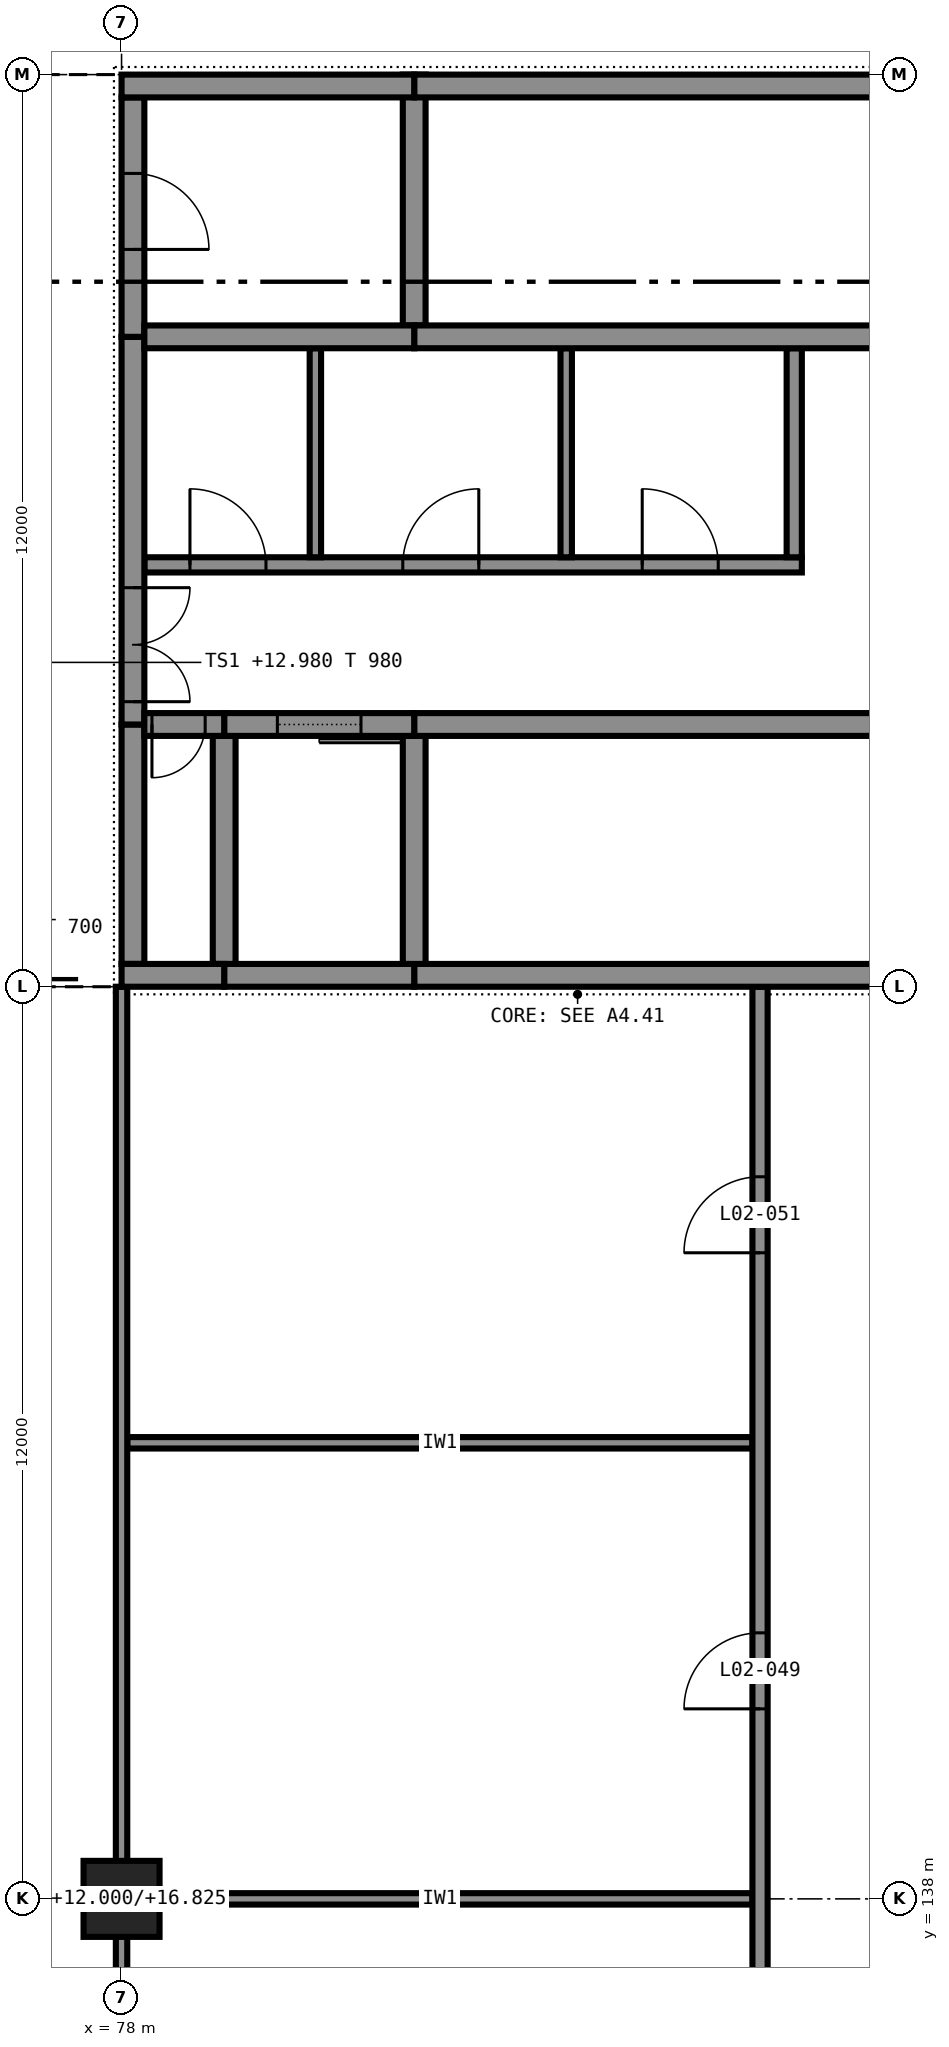
"""IFC4 building model, lengths in metres.
Left out: names, types, materials, properties, quantities, classifications, styles, units other than length and angle.
Written with IfcOpenShell. Run it as: python <this file> out.ifc"""

import sys

from ifc_helpers import new_model, si_unit, direction, frame, frame_2d, origin, origin_2d, place, context, subcontext, project, spatial, rectangle, extrude, element, fill, save


model = new_model("IFC4")
c1 = context("Model", 3, precision=1e-05, world=origin(), true_north=direction((0.0, 1.0)))
c2 = subcontext(c1, "Body", "Model", "MODEL_VIEW")
j1 = project(units=[si_unit("LENGTHUNIT", "METRE"), si_unit("PLANEANGLEUNIT", "RADIAN")], contexts=[c1])
p1 = place(None, origin())
s1 = spatial("IfcSite", under=j1, at=p1, CompositionType="ELEMENT")
p2 = place(p1, origin())
s2 = spatial("IfcBuilding", under=s1, at=p2, CompositionType="ELEMENT")
p3 = place(p2, frame((0.0, 0.0, 12.0)))
s3 = spatial("IfcBuildingStorey", under=s2, at=p3, CompositionType="ELEMENT", Elevation=12.0)
p4 = place(p3, frame((78.0, 138.0, 0.0), z_axis=(0.0, 0.0, 1.0), x_axis=(1.0, 0.0, 0.0)))
e1 = element("IfcColumn", 1, at=p4, inside=s3, PredefinedType="COLUMN", context=c2, shape_type="SweptSolid", body=[
    extrude(rectangle(XDim=1.0, YDim=1.0, at=origin_2d()), origin(), (0.0, 0.0, 1.0), 4.825),
])
p5 = place(p3, frame((90.0, 150.15, 0.0), z_axis=(0.0, 0.0, 1.0), x_axis=(-1.0, 0.0, 0.0)))
e2 = element("IfcWall", 2, at=p5, inside=s3, PredefinedType="SHEAR", context=c2, shape_type="SweptSolid", body=[
    extrude(rectangle(XDim=8.15, YDim=0.3, at=frame_2d((4.075, 0.0))), origin(), (0.0, 0.0, 1.0), 5.0),
])
p6 = place(p5, frame((0.65, 0.0, 0.0)))
e3 = element("IfcOpeningElement", 3, at=p6, cuts=e2, PredefinedType="OPENING", context=c2, shape_type="SweptSolid", body=[
    extrude(rectangle(XDim=0.9, YDim=2.1, at=frame_2d((0.45, 1.05))), frame((0.0, 0.16, 0.0), z_axis=(0.0, -1.0, 0.0), x_axis=(1.0, 0.0, 0.0)), (0.0, 0.0, 1.0), 0.32),
])
p7 = place(p3, frame((81.85, 150.15, 0.0), z_axis=(0.0, 0.0, 1.0), x_axis=(-1.0, 0.0, 0.0)))
e4 = element("IfcWall", 4, at=p7, inside=s3, PredefinedType="SHEAR", context=c2, shape_type="SweptSolid", body=[
    extrude(rectangle(XDim=2.5, YDim=0.3, at=frame_2d((1.25, 0.0))), origin(), (0.0, 0.0, 1.0), 5.0),
])
p8 = place(p3, frame((79.35, 150.15, 0.0), z_axis=(0.0, 0.0, 1.0), x_axis=(-1.0, 0.0, 0.0)))
e5 = element("IfcWall", 5, at=p8, inside=s3, PredefinedType="SHEAR", context=c2, shape_type="SweptSolid", body=[
    extrude(rectangle(XDim=1.35, YDim=0.3, at=frame_2d((0.675, 0.0))), origin(), (0.0, 0.0, 1.0), 5.0),
])
p9 = place(p3, frame((90.0, 161.85, 0.0), z_axis=(0.0, 0.0, 1.0), x_axis=(-1.0, 0.0, 0.0)))
e6 = element("IfcWall", 6, at=p9, inside=s3, PredefinedType="SHEAR", context=c2, shape_type="SweptSolid", body=[
    extrude(rectangle(XDim=8.15, YDim=0.3, at=frame_2d((4.075, 0.0))), origin(), (0.0, 0.0, 1.0), 5.0),
])
p10 = place(p3, frame((81.85, 161.85, 0.0), z_axis=(0.0, 0.0, 1.0), x_axis=(-1.0, 0.0, 0.0)))
e7 = element("IfcWall", 7, at=p10, inside=s3, PredefinedType="SHEAR", context=c2, shape_type="SweptSolid", body=[
    extrude(rectangle(XDim=3.85, YDim=0.3, at=frame_2d((1.925, 0.0))), origin(), (0.0, 0.0, 1.0), 5.0),
])
p11 = place(p3, frame((89.7, 153.45, 0.0), z_axis=(0.0, 0.0, 1.0), x_axis=(-1.0, 0.0, 0.0)))
e8 = element("IfcWall", 8, at=p11, inside=s3, PredefinedType="SHEAR", context=c2, shape_type="SweptSolid", body=[
    extrude(rectangle(XDim=7.85, YDim=0.3, at=frame_2d((3.925, 0.0))), origin(), (0.0, 0.0, 1.0), 5.0),
])
p12 = place(p11, frame((0.5, 0.0, 0.0)))
e9 = element("IfcOpeningElement", 9, at=p12, cuts=e8, PredefinedType="OPENING", context=c2, shape_type="SweptSolid", body=[
    extrude(rectangle(XDim=1.0, YDim=2.1, at=frame_2d((0.5, 1.05))), frame((0.0, 0.16, 0.0), z_axis=(0.0, -1.0, 0.0), x_axis=(1.0, 0.0, 0.0)), (0.0, 0.0, 1.0), 0.32),
])
p13 = place(p3, frame((81.85, 153.45, 0.0), z_axis=(0.0, 0.0, 1.0), x_axis=(-1.0, 0.0, 0.0)))
e10 = element("IfcWall", 10, at=p13, inside=s3, PredefinedType="SHEAR", context=c2, shape_type="SweptSolid", body=[
    extrude(rectangle(XDim=2.5, YDim=0.3, at=frame_2d((1.25, 0.0))), origin(), (0.0, 0.0, 1.0), 5.0),
])
p14 = place(p13, frame((0.7, 0.0, 0.0)))
e11 = element("IfcOpeningElement", 11, at=p14, cuts=e10, PredefinedType="OPENING", context=c2, shape_type="SweptSolid", body=[
    extrude(rectangle(XDim=1.1, YDim=2.1, at=frame_2d((0.55, 1.05))), frame((0.0, 0.16, 0.0), z_axis=(0.0, -1.0, 0.0), x_axis=(1.0, 0.0, 0.0)), (0.0, 0.0, 1.0), 0.32),
])
p15 = place(p3, frame((79.35, 153.45, 0.0), z_axis=(0.0, 0.0, 1.0), x_axis=(-1.0, 0.0, 0.0)))
e12 = element("IfcWall", 12, at=p15, inside=s3, PredefinedType="SHEAR", context=c2, shape_type="SweptSolid", body=[
    extrude(rectangle(XDim=1.05, YDim=0.3, at=frame_2d((0.525, 0.0))), origin(), (0.0, 0.0, 1.0), 5.0),
])
p16 = place(p15, frame((0.25, 0.0, 0.0)))
e13 = element("IfcOpeningElement", 13, at=p16, cuts=e12, PredefinedType="OPENING", context=c2, shape_type="SweptSolid", body=[
    extrude(rectangle(XDim=0.7, YDim=2.1, at=frame_2d((0.35, 1.05))), frame((0.0, 0.16, 0.0), z_axis=(0.0, -1.0, 0.0), x_axis=(1.0, 0.0, 0.0)), (0.0, 0.0, 1.0), 0.32),
])
p17 = place(p3, frame((89.7, 158.55, 0.0), z_axis=(0.0, 0.0, 1.0), x_axis=(-1.0, 0.0, 0.0)))
e14 = element("IfcWall", 14, at=p17, inside=s3, PredefinedType="SHEAR", context=c2, shape_type="SweptSolid", body=[
    extrude(rectangle(XDim=7.85, YDim=0.3, at=frame_2d((3.925, 0.0))), origin(), (0.0, 0.0, 1.0), 5.0),
])
p18 = place(p17, frame((0.5, 0.0, 0.0)))
e15 = element("IfcOpeningElement", 15, at=p18, cuts=e14, PredefinedType="OPENING", context=c2, shape_type="SweptSolid", body=[
    extrude(rectangle(XDim=1.0, YDim=2.1, at=frame_2d((0.5, 1.05))), frame((0.0, 0.16, 0.0), z_axis=(0.0, -1.0, 0.0), x_axis=(1.0, 0.0, 0.0)), (0.0, 0.0, 1.0), 0.32),
])
p19 = place(p3, frame((81.85, 158.55, 0.0), z_axis=(0.0, 0.0, 1.0), x_axis=(-1.0, 0.0, 0.0)))
e16 = element("IfcWall", 16, at=p19, inside=s3, PredefinedType="SHEAR", context=c2, shape_type="SweptSolid", body=[
    extrude(rectangle(XDim=3.55, YDim=0.3, at=frame_2d((1.775, 0.0))), origin(), (0.0, 0.0, 1.0), 5.0),
])
p20 = place(p3, frame((78.15, 150.3, 0.0), z_axis=(0.0, 0.0, 1.0), x_axis=(0.0, 1.0, 0.0)))
e17 = element("IfcWall", 17, at=p20, inside=s3, PredefinedType="SHEAR", context=c2, shape_type="SweptSolid", body=[
    extrude(rectangle(XDim=3.15, YDim=0.3, at=frame_2d((1.575, 0.0))), origin(), (0.0, 0.0, 1.0), 5.0),
])
p21 = place(p3, frame((78.15, 153.45, 0.0), z_axis=(0.0, 0.0, 1.0), x_axis=(0.0, 1.0, 0.0)))
e18 = element("IfcWall", 18, at=p21, inside=s3, PredefinedType="SHEAR", context=c2, shape_type="SweptSolid", body=[
    extrude(rectangle(XDim=5.1, YDim=0.3, at=frame_2d((2.55, 0.0))), origin(), (0.0, 0.0, 1.0), 5.0),
])
p22 = place(p21, frame((0.3, 0.0, 0.0)))
e19 = element("IfcOpeningElement", 19, at=p22, cuts=e18, PredefinedType="OPENING", context=c2, shape_type="SweptSolid", body=[
    extrude(rectangle(XDim=1.5, YDim=2.1, at=frame_2d((0.75, 1.05))), frame((0.0, 0.16, 0.0), z_axis=(0.0, -1.0, 0.0), x_axis=(1.0, 0.0, 0.0)), (0.0, 0.0, 1.0), 0.32),
])
p23 = place(p3, frame((78.15, 158.55, 0.0), z_axis=(0.0, 0.0, 1.0), x_axis=(0.0, 1.0, 0.0)))
e20 = element("IfcWall", 20, at=p23, inside=s3, PredefinedType="SHEAR", context=c2, shape_type="SweptSolid", body=[
    extrude(rectangle(XDim=3.15, YDim=0.3, at=frame_2d((1.575, 0.0))), origin(), (0.0, 0.0, 1.0), 5.0),
])
p24 = place(p23, frame((1.15, 0.0, 0.0)))
e21 = element("IfcOpeningElement", 21, at=p24, cuts=e20, PredefinedType="OPENING", context=c2, shape_type="SweptSolid", body=[
    extrude(rectangle(XDim=1.0, YDim=2.1, at=frame_2d((0.5, 1.05))), frame((0.0, 0.16, 0.0), z_axis=(0.0, -1.0, 0.0), x_axis=(1.0, 0.0, 0.0)), (0.0, 0.0, 1.0), 0.32),
])
p25 = place(p3, frame((81.85, 150.3, 0.0), z_axis=(0.0, 0.0, 1.0), x_axis=(0.0, 1.0, 0.0)))
e22 = element("IfcWall", 22, at=p25, inside=s3, PredefinedType="SHEAR", context=c2, shape_type="SweptSolid", body=[
    extrude(rectangle(XDim=3.0, YDim=0.3, at=frame_2d((1.5, 0.0))), origin(), (0.0, 0.0, 1.0), 5.0),
])
p26 = place(p3, frame((81.85, 158.7, 0.0), z_axis=(0.0, 0.0, 1.0), x_axis=(0.0, 1.0, 0.0)))
e23 = element("IfcWall", 23, at=p26, inside=s3, PredefinedType="SHEAR", context=c2, shape_type="SweptSolid", body=[
    extrude(rectangle(XDim=3.3, YDim=0.3, at=frame_2d((1.65, 0.0))), origin(), (0.0, 0.0, 1.0), 5.0),
])
p27 = place(p3, frame((79.35, 150.3, 0.0), z_axis=(0.0, 0.0, 1.0), x_axis=(0.0, 1.0, 0.0)))
e24 = element("IfcWall", 24, at=p27, inside=s3, PredefinedType="SHEAR", context=c2, shape_type="SweptSolid", body=[
    extrude(rectangle(XDim=3.0, YDim=0.3, at=frame_2d((1.5, 0.0))), origin(), (0.0, 0.0, 1.0), 5.0),
])
p28 = place(p2, frame((0.0, 0.0, 6.0)))
s4 = spatial("IfcBuildingStorey", under=s2, at=p28, CompositionType="ELEMENT", Elevation=6.0)
p29 = place(p28, frame((78.0, 162.0, 0.0), z_axis=(0.0, 0.0, 1.0), x_axis=(0.0, 1.0, 0.0)))
e25 = element("IfcWall", 25, at=p29, inside=s4, PredefinedType="PARTITIONING", context=c2, shape_type="SweptSolid", body=[
    extrude(rectangle(XDim=24.0, YDim=0.2, at=frame_2d((12.0, 0.0))), origin(), (0.0, 0.0, 1.0), 10.825),
])
p30 = place(p29, frame((4.8, 0.0, 0.0)))
e26 = element("IfcOpeningElement", 26, at=p30, cuts=e25, PredefinedType="OPENING", context=c2, shape_type="SweptSolid", body=[
    extrude(rectangle(XDim=2.4, YDim=2.4, at=frame_2d((1.2, 1.2))), frame((0.0, 0.11, 0.0), z_axis=(0.0, -1.0, 0.0), x_axis=(1.0, 0.0, 0.0)), (0.0, 0.0, 1.0), 0.22),
])
p31 = place(p28, frame((86.4, 162.0, 0.0), z_axis=(0.0, 0.0, 1.0), x_axis=(0.0, 1.0, 0.0)))
e27 = element("IfcWall", 27, at=p31, inside=s4, PredefinedType="PARTITIONING", context=c2, shape_type="SweptSolid", body=[
    extrude(rectangle(XDim=24.0, YDim=0.2, at=frame_2d((12.0, 0.0))), origin(), (0.0, 0.0, 1.0), 10.825),
])
p32 = place(p31, frame((5.3, 0.0, 0.0)))
e28 = element("IfcOpeningElement", 28, at=p32, cuts=e27, PredefinedType="OPENING", context=c2, shape_type="SweptSolid", body=[
    extrude(rectangle(XDim=1.4, YDim=2.1, at=frame_2d((0.7, 1.05))), frame((0.0, 0.11, 0.0), z_axis=(0.0, -1.0, 0.0), x_axis=(1.0, 0.0, 0.0)), (0.0, 0.0, 1.0), 0.22),
])
p33 = place(p31, frame((17.5, 0.0, 0.0)))
e29 = element("IfcOpeningElement", 29, at=p33, cuts=e27, PredefinedType="OPENING", context=c2, shape_type="SweptSolid", body=[
    extrude(rectangle(XDim=1.0, YDim=2.1, at=frame_2d((0.5, 1.05))), frame((0.0, 0.11, 0.0), z_axis=(0.0, -1.0, 0.0), x_axis=(1.0, 0.0, 0.0)), (0.0, 0.0, 1.0), 0.22),
])
for number, where, z_axis, x_axis in (
    (30, (78.075, 138.0, 0.0), (0.0, 0.0, 1.0), (1.0, 0.0, 0.0)),
    (31, (78.075, 144.0, 0.0), (0.0, 0.0, 1.0), (1.0, 0.0, 0.0)),
):
    element("IfcWall", number, at=place(p3, frame(where, z_axis=z_axis, x_axis=x_axis)), inside=s3, PredefinedType="PARTITIONING", context=c2, shape_type="SweptSolid", body=[
        extrude(rectangle(XDim=8.225, YDim=0.15, at=frame_2d((4.113, 0.0))), origin(), (0.0, 0.0, 1.0), 4.825),
    ])
p34 = place(p3, frame((78.3, 155.55, 0.0), z_axis=(0.0, 0.0, 1.0), x_axis=(1.0, 0.0, 0.0)))
e32 = element("IfcWall", 32, at=p34, inside=s3, PredefinedType="PARTITIONING", context=c2, shape_type="SweptSolid", body=[
    extrude(rectangle(XDim=8.65, YDim=0.2, at=frame_2d((4.325, 0.0))), origin(), (0.0, 0.0, 1.0), 4.825),
])
p35 = place(p34, frame((0.6, 0.0, 0.0)))
e33 = element("IfcOpeningElement", 33, at=p35, cuts=e32, PredefinedType="OPENING", context=c2, shape_type="SweptSolid", body=[
    extrude(rectangle(XDim=1.0, YDim=2.1, at=frame_2d((0.5, 1.05))), frame((0.0, 0.11, 0.0), z_axis=(0.0, -1.0, 0.0), x_axis=(1.0, 0.0, 0.0)), (0.0, 0.0, 1.0), 0.22),
])
p36 = place(p34, frame((3.4, 0.0, 0.0)))
e34 = element("IfcOpeningElement", 34, at=p36, cuts=e32, PredefinedType="OPENING", context=c2, shape_type="SweptSolid", body=[
    extrude(rectangle(XDim=1.0, YDim=2.1, at=frame_2d((0.5, 1.05))), frame((0.0, 0.11, 0.0), z_axis=(0.0, -1.0, 0.0), x_axis=(1.0, 0.0, 0.0)), (0.0, 0.0, 1.0), 0.22),
])
p37 = place(p34, frame((6.55, 0.0, 0.0)))
e35 = element("IfcOpeningElement", 35, at=p37, cuts=e32, PredefinedType="OPENING", context=c2, shape_type="SweptSolid", body=[
    extrude(rectangle(XDim=1.0, YDim=2.1, at=frame_2d((0.5, 1.05))), frame((0.0, 0.11, 0.0), z_axis=(0.0, -1.0, 0.0), x_axis=(1.0, 0.0, 0.0)), (0.0, 0.0, 1.0), 0.22),
])
p38 = place(p3, frame((78.0, 114.1, 0.0), z_axis=(0.0, 0.0, 1.0), x_axis=(0.0, 1.0, 0.0)))
e36 = element("IfcWall", 36, at=p38, inside=s3, PredefinedType="PARTITIONING", context=c2, shape_type="SweptSolid", body=[
    extrude(rectangle(XDim=35.9, YDim=0.15, at=frame_2d((17.95, 0.0))), origin(), (0.0, 0.0, 1.0), 4.825),
])
for number, where, z_axis, x_axis in (
    (37, (80.55, 155.65, 0.0), (0.0, 0.0, 1.0), (0.0, 1.0, 0.0)),
    (38, (83.85, 155.65, 0.0), (0.0, 0.0, 1.0), (0.0, 1.0, 0.0)),
):
    element("IfcWall", number, at=place(p3, frame(where, z_axis=z_axis, x_axis=x_axis)), inside=s3, PredefinedType="PARTITIONING", context=c2, shape_type="SweptSolid", body=[
        extrude(rectangle(XDim=2.75, YDim=0.15, at=frame_2d((1.375, 0.0))), origin(), (0.0, 0.0, 1.0), 4.825),
    ])
p39 = place(p3, frame((86.4, 114.0, 0.0), z_axis=(0.0, 0.0, 1.0), x_axis=(0.0, 1.0, 0.0)))
e39 = element("IfcWall", 39, at=p39, inside=s3, PredefinedType="PARTITIONING", context=c2, shape_type="SweptSolid", body=[
    extrude(rectangle(XDim=36.0, YDim=0.2, at=frame_2d((18.0, 0.0))), origin(), (0.0, 0.0, 1.0), 4.825),
])
p40 = place(p39, frame((2.5, 0.0, 0.0)))
e40 = element("IfcOpeningElement", 40, at=p40, cuts=e39, PredefinedType="OPENING", context=c2, shape_type="SweptSolid", body=[
    extrude(rectangle(XDim=1.0, YDim=2.1, at=frame_2d((0.5, 1.05))), frame((0.0, 0.11, 0.0), z_axis=(0.0, -1.0, 0.0), x_axis=(1.0, 0.0, 0.0)), (0.0, 0.0, 1.0), 0.22),
])
p41 = place(p39, frame((8.5, 0.0, 0.0)))
e41 = element("IfcOpeningElement", 41, at=p41, cuts=e39, PredefinedType="OPENING", context=c2, shape_type="SweptSolid", body=[
    extrude(rectangle(XDim=1.0, YDim=2.1, at=frame_2d((0.5, 1.05))), frame((0.0, 0.11, 0.0), z_axis=(0.0, -1.0, 0.0), x_axis=(1.0, 0.0, 0.0)), (0.0, 0.0, 1.0), 0.22),
])
p42 = place(p39, frame((14.5, 0.0, 0.0)))
e42 = element("IfcOpeningElement", 42, at=p42, cuts=e39, PredefinedType="OPENING", context=c2, shape_type="SweptSolid", body=[
    extrude(rectangle(XDim=1.0, YDim=2.1, at=frame_2d((0.5, 1.05))), frame((0.0, 0.11, 0.0), z_axis=(0.0, -1.0, 0.0), x_axis=(1.0, 0.0, 0.0)), (0.0, 0.0, 1.0), 0.22),
])
p43 = place(p39, frame((20.5, 0.0, 0.0)))
e43 = element("IfcOpeningElement", 43, at=p43, cuts=e39, PredefinedType="OPENING", context=c2, shape_type="SweptSolid", body=[
    extrude(rectangle(XDim=1.0, YDim=2.1, at=frame_2d((0.5, 1.05))), frame((0.0, 0.11, 0.0), z_axis=(0.0, -1.0, 0.0), x_axis=(1.0, 0.0, 0.0)), (0.0, 0.0, 1.0), 0.22),
])
p44 = place(p39, frame((26.5, 0.0, 0.0)))
e44 = element("IfcOpeningElement", 44, at=p44, cuts=e39, PredefinedType="OPENING", context=c2, shape_type="SweptSolid", body=[
    extrude(rectangle(XDim=1.0, YDim=2.1, at=frame_2d((0.5, 1.05))), frame((0.0, 0.11, 0.0), z_axis=(0.0, -1.0, 0.0), x_axis=(1.0, 0.0, 0.0)), (0.0, 0.0, 1.0), 0.22),
])
p45 = place(p39, frame((32.5, 0.0, 0.0)))
e45 = element("IfcOpeningElement", 45, at=p45, cuts=e39, PredefinedType="OPENING", context=c2, shape_type="SweptSolid", body=[
    extrude(rectangle(XDim=1.0, YDim=2.1, at=frame_2d((0.5, 1.05))), frame((0.0, 0.11, 0.0), z_axis=(0.0, -1.0, 0.0), x_axis=(1.0, 0.0, 0.0)), (0.0, 0.0, 1.0), 0.22),
])
p46 = place(p3, frame((86.85, 155.65, 0.0), z_axis=(0.0, 0.0, 1.0), x_axis=(0.0, 1.0, 0.0)))
e46 = element("IfcWall", 46, at=p46, inside=s3, PredefinedType="PARTITIONING", context=c2, shape_type="SweptSolid", body=[
    extrude(rectangle(XDim=2.75, YDim=0.2, at=frame_2d((1.375, 0.0))), origin(), (0.0, 0.0, 1.0), 4.825),
])
p47 = place(p44, origin())
e47 = element("IfcDoor", 47, at=p47, inside=s3, OperationType="SINGLE_SWING_RIGHT", PredefinedType="DOOR", context=c2, shape_type="SweptSolid", body=[
    extrude(rectangle(XDim=1.0, YDim=2.1, at=frame_2d((0.5, 1.05))), frame((0.0, 0.025, 0.0), z_axis=(0.0, -1.0, 0.0), x_axis=(1.0, 0.0, 0.0)), (0.0, 0.0, 1.0), 0.05),
])
fill(e44, e47)
p48 = place(p45, origin())
e48 = element("IfcDoor", 48, at=p48, inside=s3, OperationType="SINGLE_SWING_RIGHT", PredefinedType="DOOR", context=c2, shape_type="SweptSolid", body=[
    extrude(rectangle(XDim=1.0, YDim=2.1, at=frame_2d((0.5, 1.05))), frame((0.0, 0.025, 0.0), z_axis=(0.0, -1.0, 0.0), x_axis=(1.0, 0.0, 0.0)), (0.0, 0.0, 1.0), 0.05),
])
fill(e45, e48)
p49 = place(p16, origin())
e49 = element("IfcDoor", 49, at=p49, inside=s3, OperationType="SINGLE_SWING_LEFT", PredefinedType="DOOR", context=c2, shape_type="SweptSolid", body=[
    extrude(rectangle(XDim=0.7, YDim=2.1, at=frame_2d((0.35, 1.05))), frame((0.0, 0.025, 0.0), z_axis=(0.0, -1.0, 0.0), x_axis=(1.0, 0.0, 0.0)), (0.0, 0.0, 1.0), 0.05),
])
fill(e13, e49)
p50 = place(p14, origin())
e50 = element("IfcDoor", 50, at=p50, inside=s3, OperationType="SLIDING_TO_LEFT", PredefinedType="DOOR", context=c2, shape_type="SweptSolid", body=[
    extrude(rectangle(XDim=1.1, YDim=2.1, at=frame_2d((0.55, 1.05))), frame((0.0, 0.025, 0.0), z_axis=(0.0, -1.0, 0.0), x_axis=(1.0, 0.0, 0.0)), (0.0, 0.0, 1.0), 0.05),
])
fill(e11, e50)
p51 = place(p22, frame((1.5, 0.0, 0.0), z_axis=(0.0, 0.0, 1.0), x_axis=(-1.0, 0.0, 0.0)))
e51 = element("IfcDoor", 51, at=p51, inside=s3, OperationType="DOUBLE_DOOR_SINGLE_SWING", PredefinedType="DOOR", context=c2, shape_type="SweptSolid", body=[
    extrude(rectangle(XDim=1.5, YDim=2.1, at=frame_2d((0.75, 1.05))), frame((0.0, 0.025, 0.0), z_axis=(0.0, -1.0, 0.0), x_axis=(1.0, 0.0, 0.0)), (0.0, 0.0, 1.0), 0.05),
])
fill(e19, e51)
p52 = place(p35, origin())
e52 = element("IfcDoor", 52, at=p52, inside=s3, OperationType="SINGLE_SWING_RIGHT", PredefinedType="DOOR", context=c2, shape_type="SweptSolid", body=[
    extrude(rectangle(XDim=1.0, YDim=2.1, at=frame_2d((0.5, 1.05))), frame((0.0, 0.025, 0.0), z_axis=(0.0, -1.0, 0.0), x_axis=(1.0, 0.0, 0.0)), (0.0, 0.0, 1.0), 0.05),
])
fill(e33, e52)
p53 = place(p36, origin())
e53 = element("IfcDoor", 53, at=p53, inside=s3, OperationType="SINGLE_SWING_LEFT", PredefinedType="DOOR", context=c2, shape_type="SweptSolid", body=[
    extrude(rectangle(XDim=1.0, YDim=2.1, at=frame_2d((0.5, 1.05))), frame((0.0, 0.025, 0.0), z_axis=(0.0, -1.0, 0.0), x_axis=(1.0, 0.0, 0.0)), (0.0, 0.0, 1.0), 0.05),
])
fill(e34, e53)
p54 = place(p37, origin())
e54 = element("IfcDoor", 54, at=p54, inside=s3, OperationType="SINGLE_SWING_RIGHT", PredefinedType="DOOR", context=c2, shape_type="SweptSolid", body=[
    extrude(rectangle(XDim=1.0, YDim=2.1, at=frame_2d((0.5, 1.05))), frame((0.0, 0.025, 0.0), z_axis=(0.0, -1.0, 0.0), x_axis=(1.0, 0.0, 0.0)), (0.0, 0.0, 1.0), 0.05),
])
fill(e35, e54)
p55 = place(p24, frame((1.0, 0.0, 0.0), z_axis=(0.0, 0.0, 1.0), x_axis=(-1.0, 0.0, 0.0)))
e55 = element("IfcDoor", 55, at=p55, inside=s3, OperationType="SINGLE_SWING_LEFT", PredefinedType="DOOR", context=c2, shape_type="SweptSolid", body=[
    extrude(rectangle(XDim=1.0, YDim=2.1, at=frame_2d((0.5, 1.05))), frame((0.0, 0.025, 0.0), z_axis=(0.0, -1.0, 0.0), x_axis=(1.0, 0.0, 0.0)), (0.0, 0.0, 1.0), 0.05),
])
fill(e21, e55)
save(model, sys.argv[1])
